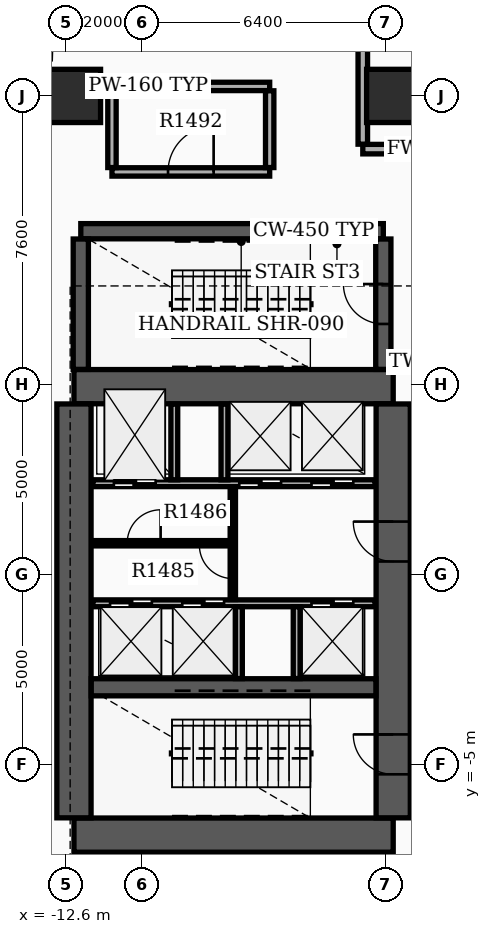
"""IFC4 building model, lengths in metres.
Left out: names, types, materials, properties, quantities, classifications, styles, units other than length and angle.
Written with IfcOpenShell. Run it as: python <this file> out.ifc"""

import sys

from ifc_helpers import new_model, si_unit, direction, frame, frame_2d, origin, origin_2d, place, context, subcontext, project, spatial, rectangle, extrude, element, fill, save


model = new_model("IFC4")
c1 = context("Model", 3, precision=1e-05, world=origin(), true_north=direction((0.0, 1.0)))
c2 = subcontext(c1, "Body", "Model", "MODEL_VIEW")
j1 = project(units=[si_unit("LENGTHUNIT", "METRE"), si_unit("PLANEANGLEUNIT", "RADIAN")], contexts=[c1])
p1 = place(None, origin())
s1 = spatial("IfcSite", under=j1, at=p1, CompositionType="ELEMENT")
p2 = place(p1, origin())
s2 = spatial("IfcBuilding", under=s1, at=p2, CompositionType="ELEMENT")
p3 = place(p2, frame((0.0, 0.0, 95.1)))
s3 = spatial("IfcBuildingStorey", under=s2, at=p3, CompositionType="ELEMENT", Elevation=95.1)
for number, where, z_axis, x_axis in (
    (1, (-12.4, -6.85, 0.0), (0.0, 0.0, 1.0), (1.0, 0.0, 0.0)),
    (2, (-12.4, 4.95, 0.0), (0.0, 0.0, 1.0), (1.0, 0.0, 0.0)),
):
    element("IfcWall", number, at=place(p3, frame(where, z_axis=z_axis, x_axis=x_axis)), inside=s3, PredefinedType="SHEAR", context=c2, shape_type="SweptSolid", body=[
        extrude(rectangle(XDim=8.4, YDim=0.9, at=frame_2d((4.2, 0.0))), origin(), (0.0, 0.0, 1.0), 4.85),
    ])
p4 = place(p3, frame((-12.4, -6.395, 0.0), z_axis=(0.0, 0.0, 1.0), x_axis=(0.0, 1.0, 0.0)))
e3 = element("IfcWall", 3, at=p4, inside=s3, PredefinedType="SHEAR", context=c2, shape_type="SweptSolid", body=[
    extrude(rectangle(XDim=10.89, YDim=0.9, at=frame_2d((5.445, 0.0))), origin(), (0.0, 0.0, 1.0), 4.85),
])
p5 = place(p3, frame((-4.0, -6.395, 0.0), z_axis=(0.0, 0.0, 1.0), x_axis=(0.0, 1.0, 0.0)))
e4 = element("IfcWall", 4, at=p5, inside=s3, PredefinedType="SHEAR", context=c2, shape_type="SweptSolid", body=[
    extrude(rectangle(XDim=10.89, YDim=0.9, at=frame_2d((5.445, 0.0))), origin(), (0.0, 0.0, 1.0), 4.85),
])
p6 = place(p5, frame((1.145, 0.0, 0.0)))
e5 = element("IfcOpeningElement", 5, at=p6, cuts=e4, PredefinedType="OPENING", context=c2, shape_type="SweptSolid", body=[
    extrude(rectangle(XDim=1.05, YDim=2.15, at=frame_2d((0.525, 1.075))), frame((0.0, 0.46, 0.0), z_axis=(0.0, -1.0, 0.0), x_axis=(1.0, 0.0, 0.0)), (0.0, 0.0, 1.0), 0.92),
])
p7 = place(p5, frame((6.745, 0.0, 0.0)))
e6 = element("IfcOpeningElement", 6, at=p7, cuts=e4, PredefinedType="OPENING", context=c2, shape_type="SweptSolid", body=[
    extrude(rectangle(XDim=1.05, YDim=2.15, at=frame_2d((0.525, 1.075))), frame((0.0, 0.46, 0.0), z_axis=(0.0, -1.0, 0.0), x_axis=(1.0, 0.0, 0.0)), (0.0, 0.0, 1.0), 0.92),
])
p8 = place(p3, frame((-11.945, -2.96, 0.0), z_axis=(0.0, 0.0, 1.0), x_axis=(1.0, 0.0, 0.0)))
e7 = element("IfcWall", 7, at=p8, inside=s3, PredefinedType="SHEAR", context=c2, shape_type="SweptSolid", body=[
    extrude(rectangle(XDim=7.49, YDim=0.45, at=frame_2d((3.745, 0.0))), origin(), (0.0, 0.0, 1.0), 4.85),
])
p9 = place(p3, frame((-12.22, 9.04, 0.0), z_axis=(0.0, 0.0, 1.0), x_axis=(1.0, 0.0, 0.0)))
e8 = element("IfcWall", 8, at=p9, inside=s3, PredefinedType="SHEAR", context=c2, shape_type="SweptSolid", body=[
    extrude(rectangle(XDim=7.96, YDim=0.4, at=frame_2d((3.98, 0.0))), origin(), (0.0, 0.0, 1.0), 4.85),
])
p10 = place(p3, frame((-12.22, 5.405, 0.0), z_axis=(0.0, 0.0, 1.0), x_axis=(0.0, 1.0, 0.0)))
e9 = element("IfcWall", 9, at=p10, inside=s3, PredefinedType="SHEAR", context=c2, shape_type="SweptSolid", body=[
    extrude(rectangle(XDim=3.43, YDim=0.4, at=frame_2d((1.715, 0.0))), origin(), (0.0, 0.0, 1.0), 4.85),
])
p11 = place(p3, frame((-4.26, 5.405, 0.0), z_axis=(0.0, 0.0, 1.0), x_axis=(0.0, 1.0, 0.0)))
e10 = element("IfcWall", 10, at=p11, inside=s3, PredefinedType="SHEAR", context=c2, shape_type="SweptSolid", body=[
    extrude(rectangle(XDim=3.43, YDim=0.4, at=frame_2d((1.715, 0.0))), origin(), (0.0, 0.0, 1.0), 4.85),
])
p12 = place(p11, frame((1.195, 0.0, 0.0)))
e11 = element("IfcOpeningElement", 11, at=p12, cuts=e10, PredefinedType="OPENING", context=c2, shape_type="SweptSolid", body=[
    extrude(rectangle(XDim=1.05, YDim=2.15, at=frame_2d((0.525, 1.075))), frame((0.0, 0.21, 0.0), z_axis=(0.0, -1.0, 0.0), x_axis=(1.0, 0.0, 0.0)), (0.0, 0.0, 1.0), 0.42),
])
for number, where, z_axis, x_axis in (
    (12, (-12.4, 12.6, 0.0), (0.0, 0.0, 1.0), (1.0, 0.0, 0.0)),
    (13, (-4.0, 12.6, 0.0), (0.0, 0.0, 1.0), (1.0, 0.0, 0.0)),
):
    element("IfcColumn", number, at=place(p3, frame(where, z_axis=z_axis, x_axis=x_axis)), inside=s3, PredefinedType="COLUMN", context=c2, shape_type="SweptSolid", body=[
        extrude(rectangle(XDim=1.4, YDim=1.4, at=origin_2d()), origin(), (0.0, 0.0, 1.0), 5.1),
    ])
p13 = place(p3, frame((-11.9, 2.41, 0.0), z_axis=(0.0, 0.0, 1.0), x_axis=(1.0, 0.0, 0.0)))
e14 = element("IfcWall", 14, at=p13, inside=s3, PredefinedType="SOLIDWALL", context=c2, shape_type="SweptSolid", body=[
    extrude(rectangle(XDim=7.42, YDim=0.18, at=frame_2d((3.71, 0.0))), origin(), (0.0, 0.0, 1.0), 3.92),
])
p14 = place(p13, frame((0.55, 0.0, 0.0)))
e15 = element("IfcOpeningElement", 15, at=p14, cuts=e14, PredefinedType="OPENING", context=c2, shape_type="SweptSolid", body=[
    extrude(rectangle(XDim=1.1, YDim=2.15, at=frame_2d((0.55, 1.075))), frame((0.0, 0.1, 0.0), z_axis=(0.0, -1.0, 0.0), x_axis=(1.0, 0.0, 0.0)), (0.0, 0.0, 1.0), 0.2),
])
p15 = place(p13, frame((3.85, 0.0, 0.0)))
e16 = element("IfcOpeningElement", 16, at=p15, cuts=e14, PredefinedType="OPENING", context=c2, shape_type="SweptSolid", body=[
    extrude(rectangle(XDim=1.1, YDim=2.15, at=frame_2d((0.55, 1.075))), frame((0.0, 0.1, 0.0), z_axis=(0.0, -1.0, 0.0), x_axis=(1.0, 0.0, 0.0)), (0.0, 0.0, 1.0), 0.2),
])
p16 = place(p13, frame((5.75, 0.0, 0.0)))
e17 = element("IfcOpeningElement", 17, at=p16, cuts=e14, PredefinedType="OPENING", context=c2, shape_type="SweptSolid", body=[
    extrude(rectangle(XDim=1.1, YDim=2.15, at=frame_2d((0.55, 1.075))), frame((0.0, 0.1, 0.0), z_axis=(0.0, -1.0, 0.0), x_axis=(1.0, 0.0, 0.0)), (0.0, 0.0, 1.0), 0.2),
])
p17 = place(p3, frame((-11.9, -0.75, 0.0), z_axis=(0.0, 0.0, 1.0), x_axis=(1.0, 0.0, 0.0)))
e18 = element("IfcWall", 18, at=p17, inside=s3, PredefinedType="SOLIDWALL", context=c2, shape_type="SweptSolid", body=[
    extrude(rectangle(XDim=7.42, YDim=0.18, at=frame_2d((3.71, 0.0))), origin(), (0.0, 0.0, 1.0), 3.92),
])
p18 = place(p17, frame((0.45, 0.0, 0.0)))
e19 = element("IfcOpeningElement", 19, at=p18, cuts=e18, PredefinedType="OPENING", context=c2, shape_type="SweptSolid", body=[
    extrude(rectangle(XDim=1.1, YDim=2.15, at=frame_2d((0.55, 1.075))), frame((0.0, 0.1, 0.0), z_axis=(0.0, -1.0, 0.0), x_axis=(1.0, 0.0, 0.0)), (0.0, 0.0, 1.0), 0.2),
])
p19 = place(p17, frame((2.35, 0.0, 0.0)))
e20 = element("IfcOpeningElement", 20, at=p19, cuts=e18, PredefinedType="OPENING", context=c2, shape_type="SweptSolid", body=[
    extrude(rectangle(XDim=1.1, YDim=2.15, at=frame_2d((0.55, 1.075))), frame((0.0, 0.1, 0.0), z_axis=(0.0, -1.0, 0.0), x_axis=(1.0, 0.0, 0.0)), (0.0, 0.0, 1.0), 0.2),
])
p20 = place(p17, frame((5.75, 0.0, 0.0)))
e21 = element("IfcOpeningElement", 21, at=p20, cuts=e18, PredefinedType="OPENING", context=c2, shape_type="SweptSolid", body=[
    extrude(rectangle(XDim=1.1, YDim=2.15, at=frame_2d((0.55, 1.075))), frame((0.0, 0.1, 0.0), z_axis=(0.0, -1.0, 0.0), x_axis=(1.0, 0.0, 0.0)), (0.0, 0.0, 1.0), 0.2),
])
for number, where, z_axis, x_axis in (
    (22, (-9.76, 2.5, 0.0), (0.0, 0.0, 1.0), (0.0, 1.0, 0.0)),
    (23, (-8.44, 2.5, 0.0), (0.0, 0.0, 1.0), (0.0, 1.0, 0.0)),
):
    element("IfcWall", number, at=place(p3, frame(where, z_axis=z_axis, x_axis=x_axis)), inside=s3, PredefinedType="SOLIDWALL", context=c2, shape_type="SweptSolid", body=[
        extrude(rectangle(XDim=1.99, YDim=0.18, at=frame_2d((0.995, 0.0))), origin(), (0.0, 0.0, 1.0), 3.92),
    ])
for number, where, z_axis, x_axis in (
    (24, (-8.06, -2.73, 0.0), (0.0, 0.0, 1.0), (0.0, 1.0, 0.0)),
    (25, (-6.54, -2.73, 0.0), (0.0, 0.0, 1.0), (0.0, 1.0, 0.0)),
):
    element("IfcWall", number, at=place(p3, frame(where, z_axis=z_axis, x_axis=x_axis)), inside=s3, PredefinedType="SOLIDWALL", context=c2, shape_type="SweptSolid", body=[
        extrude(rectangle(XDim=1.89, YDim=0.18, at=frame_2d((0.945, 0.0))), origin(), (0.0, 0.0, 1.0), 3.92),
    ])
p21 = place(p3, frame((-8.22, -0.65, 0.0), z_axis=(0.0, 0.0, 1.0), x_axis=(0.0, 1.0, 0.0)))
e26 = element("IfcWall", 26, at=p21, inside=s3, PredefinedType="SOLIDWALL", context=c2, shape_type="SweptSolid", body=[
    extrude(rectangle(XDim=2.96, YDim=0.14, at=frame_2d((1.48, 0.0))), origin(), (0.0, 0.0, 1.0), 3.92),
])
p22 = place(p21, frame((0.55, 0.0, 0.0)))
e27 = element("IfcOpeningElement", 27, at=p22, cuts=e26, PredefinedType="OPENING", context=c2, shape_type="SweptSolid", body=[
    extrude(rectangle(XDim=0.88, YDim=2.1, at=frame_2d((0.44, 1.05))), frame((0.0, 0.08, 0.0), z_axis=(0.0, -1.0, 0.0), x_axis=(1.0, 0.0, 0.0)), (0.0, 0.0, 1.0), 0.16),
])
p23 = place(p3, frame((-11.85, 0.83, 0.0), z_axis=(0.0, 0.0, 1.0), x_axis=(1.0, 0.0, 0.0)))
e28 = element("IfcWall", 28, at=p23, inside=s3, PredefinedType="PARTITIONING", context=c2, shape_type="SweptSolid", body=[
    extrude(rectangle(XDim=3.552, YDim=0.14, at=frame_2d((1.776, 0.0))), origin(), (0.0, 0.0, 1.0), 3.92),
])
p24 = place(p23, frame((0.85, 0.0, 0.0)))
e29 = element("IfcOpeningElement", 29, at=p24, cuts=e28, PredefinedType="OPENING", context=c2, shape_type="SweptSolid", body=[
    extrude(rectangle(XDim=0.88, YDim=2.1, at=frame_2d((0.44, 1.05))), frame((0.0, 0.08, 0.0), z_axis=(0.0, -1.0, 0.0), x_axis=(1.0, 0.0, 0.0)), (0.0, 0.0, 1.0), 0.16),
])
p25 = place(p3, frame((-4.8, 11.2, 0.0), z_axis=(0.0, 0.0, 1.0), x_axis=(1.0, 0.0, 0.0)))
e30 = element("IfcWall", 30, at=p25, inside=s3, PredefinedType="SOLIDWALL", context=c2, shape_type="SweptSolid", body=[
    extrude(rectangle(XDim=9.6, YDim=0.25, at=frame_2d((4.8, 0.0))), origin(), (0.0, 0.0, 1.0), 3.92),
])
p26 = place(p25, frame((4.2, 0.0, 0.0)))
e31 = element("IfcOpeningElement", 31, at=p26, cuts=e30, PredefinedType="OPENING", context=c2, shape_type="SweptSolid", body=[
    extrude(rectangle(XDim=1.2, YDim=2.15, at=frame_2d((0.6, 1.075))), frame((0.0, 0.135, 0.0), z_axis=(0.0, -1.0, 0.0), x_axis=(1.0, 0.0, 0.0)), (0.0, 0.0, 1.0), 0.27),
])
p27 = place(p3, frame((-4.8, 11.33, 0.0), z_axis=(0.0, 0.0, 1.0), x_axis=(0.0, 1.0, 0.0)))
e32 = element("IfcWall", 32, at=p27, inside=s3, PredefinedType="SOLIDWALL", context=c2, shape_type="SweptSolid", body=[
    extrude(rectangle(XDim=7.04, YDim=0.25, at=frame_2d((3.52, 0.0))), origin(), (0.0, 0.0, 1.0), 3.92),
])
p28 = place(p3, frame((-11.4, 10.6, 0.0), z_axis=(0.0, 0.0, 1.0), x_axis=(1.0, 0.0, 0.0)))
e33 = element("IfcWall", 33, at=p28, inside=s3, PredefinedType="PARTITIONING", context=c2, shape_type="SweptSolid", body=[
    extrude(rectangle(XDim=4.15, YDim=0.22, at=frame_2d((2.075, 0.0))), origin(), (0.0, 0.0, 1.0), 3.92),
])
p29 = place(p28, frame((1.475, 0.0, 0.0)))
e34 = element("IfcOpeningElement", 34, at=p29, cuts=e33, PredefinedType="OPENING", context=c2, shape_type="SweptSolid", body=[
    extrude(rectangle(XDim=1.2, YDim=2.15, at=frame_2d((0.6, 1.075))), frame((0.0, 0.12, 0.0), z_axis=(0.0, -1.0, 0.0), x_axis=(1.0, 0.0, 0.0)), (0.0, 0.0, 1.0), 0.24),
])
p30 = place(p3, frame((-11.4, 12.85, 0.0), z_axis=(0.0, 0.0, 1.0), x_axis=(1.0, 0.0, 0.0)))
e35 = element("IfcWall", 35, at=p30, inside=s3, PredefinedType="PARTITIONING", context=c2, shape_type="SweptSolid", body=[
    extrude(rectangle(XDim=4.15, YDim=0.22, at=frame_2d((2.075, 0.0))), origin(), (0.0, 0.0, 1.0), 3.92),
])
for number, where, z_axis, x_axis in (
    (36, (-11.4, 10.715, 0.0), (0.0, 0.0, 1.0), (0.0, 1.0, 0.0)),
    (37, (-7.25, 10.715, 0.0), (0.0, 0.0, 1.0), (0.0, 1.0, 0.0)),
):
    element("IfcWall", number, at=place(p3, frame(where, z_axis=z_axis, x_axis=x_axis)), inside=s3, PredefinedType="PARTITIONING", context=c2, shape_type="SweptSolid", body=[
        extrude(rectangle(XDim=2.02, YDim=0.22, at=frame_2d((1.01, 0.0))), origin(), (0.0, 0.0, 1.0), 3.92),
    ])
p31 = place(p6, origin())
e38 = element("IfcDoor", 38, at=p31, inside=s3, OperationType="SINGLE_SWING_RIGHT", PredefinedType="DOOR", context=c2, shape_type="SweptSolid", body=[
    extrude(rectangle(XDim=1.05, YDim=2.15, at=frame_2d((0.525, 1.075))), frame((0.0, 0.025, 0.0), z_axis=(0.0, -1.0, 0.0), x_axis=(1.0, 0.0, 0.0)), (0.0, 0.0, 1.0), 0.05),
])
fill(e5, e38)
p32 = place(p7, origin())
e39 = element("IfcDoor", 39, at=p32, inside=s3, OperationType="SINGLE_SWING_RIGHT", PredefinedType="DOOR", context=c2, shape_type="SweptSolid", body=[
    extrude(rectangle(XDim=1.05, YDim=2.15, at=frame_2d((0.525, 1.075))), frame((0.0, 0.025, 0.0), z_axis=(0.0, -1.0, 0.0), x_axis=(1.0, 0.0, 0.0)), (0.0, 0.0, 1.0), 0.05),
])
fill(e6, e39)
p33 = place(p12, origin())
e40 = element("IfcDoor", 40, at=p33, inside=s3, OperationType="SINGLE_SWING_RIGHT", PredefinedType="DOOR", context=c2, shape_type="SweptSolid", body=[
    extrude(rectangle(XDim=1.05, YDim=2.15, at=frame_2d((0.525, 1.075))), frame((0.0, 0.025, 0.0), z_axis=(0.0, -1.0, 0.0), x_axis=(1.0, 0.0, 0.0)), (0.0, 0.0, 1.0), 0.05),
])
fill(e11, e40)
p34 = place(p14, origin())
e41 = element("IfcDoor", 41, at=p34, inside=s3, OperationType="DOUBLE_DOOR_SLIDING", PredefinedType="DOOR", context=c2, shape_type="SweptSolid", body=[
    extrude(rectangle(XDim=1.1, YDim=2.15, at=frame_2d((0.55, 1.075))), frame((0.0, 0.025, 0.0), z_axis=(0.0, -1.0, 0.0), x_axis=(1.0, 0.0, 0.0)), (0.0, 0.0, 1.0), 0.05),
])
fill(e15, e41)
p35 = place(p15, origin())
e42 = element("IfcDoor", 42, at=p35, inside=s3, OperationType="DOUBLE_DOOR_SLIDING", PredefinedType="DOOR", context=c2, shape_type="SweptSolid", body=[
    extrude(rectangle(XDim=1.1, YDim=2.15, at=frame_2d((0.55, 1.075))), frame((0.0, 0.025, 0.0), z_axis=(0.0, -1.0, 0.0), x_axis=(1.0, 0.0, 0.0)), (0.0, 0.0, 1.0), 0.05),
])
fill(e16, e42)
p36 = place(p16, origin())
e43 = element("IfcDoor", 43, at=p36, inside=s3, OperationType="DOUBLE_DOOR_SLIDING", PredefinedType="DOOR", context=c2, shape_type="SweptSolid", body=[
    extrude(rectangle(XDim=1.1, YDim=2.15, at=frame_2d((0.55, 1.075))), frame((0.0, 0.025, 0.0), z_axis=(0.0, -1.0, 0.0), x_axis=(1.0, 0.0, 0.0)), (0.0, 0.0, 1.0), 0.05),
])
fill(e17, e43)
p37 = place(p18, origin())
e44 = element("IfcDoor", 44, at=p37, inside=s3, OperationType="DOUBLE_DOOR_SLIDING", PredefinedType="DOOR", context=c2, shape_type="SweptSolid", body=[
    extrude(rectangle(XDim=1.1, YDim=2.15, at=frame_2d((0.55, 1.075))), frame((0.0, 0.025, 0.0), z_axis=(0.0, -1.0, 0.0), x_axis=(1.0, 0.0, 0.0)), (0.0, 0.0, 1.0), 0.05),
])
fill(e19, e44)
p38 = place(p19, origin())
e45 = element("IfcDoor", 45, at=p38, inside=s3, OperationType="DOUBLE_DOOR_SLIDING", PredefinedType="DOOR", context=c2, shape_type="SweptSolid", body=[
    extrude(rectangle(XDim=1.1, YDim=2.15, at=frame_2d((0.55, 1.075))), frame((0.0, 0.025, 0.0), z_axis=(0.0, -1.0, 0.0), x_axis=(1.0, 0.0, 0.0)), (0.0, 0.0, 1.0), 0.05),
])
fill(e20, e45)
p39 = place(p20, origin())
e46 = element("IfcDoor", 46, at=p39, inside=s3, OperationType="DOUBLE_DOOR_SLIDING", PredefinedType="DOOR", context=c2, shape_type="SweptSolid", body=[
    extrude(rectangle(XDim=1.1, YDim=2.15, at=frame_2d((0.55, 1.075))), frame((0.0, 0.025, 0.0), z_axis=(0.0, -1.0, 0.0), x_axis=(1.0, 0.0, 0.0)), (0.0, 0.0, 1.0), 0.05),
])
fill(e21, e46)
p40 = place(p22, origin())
e47 = element("IfcDoor", 47, at=p40, inside=s3, OperationType="SINGLE_SWING_RIGHT", PredefinedType="DOOR", context=c2, shape_type="SweptSolid", body=[
    extrude(rectangle(XDim=0.88, YDim=2.1, at=frame_2d((0.44, 1.05))), frame((0.0, 0.025, 0.0), z_axis=(0.0, -1.0, 0.0), x_axis=(1.0, 0.0, 0.0)), (0.0, 0.0, 1.0), 0.05),
])
fill(e27, e47)
p41 = place(p24, origin())
e48 = element("IfcDoor", 48, at=p41, inside=s3, OperationType="SINGLE_SWING_RIGHT", PredefinedType="DOOR", context=c2, shape_type="SweptSolid", body=[
    extrude(rectangle(XDim=0.88, YDim=2.1, at=frame_2d((0.44, 1.05))), frame((0.0, 0.025, 0.0), z_axis=(0.0, -1.0, 0.0), x_axis=(1.0, 0.0, 0.0)), (0.0, 0.0, 1.0), 0.05),
])
fill(e29, e48)
p42 = place(p29, origin())
e49 = element("IfcDoor", 49, at=p42, inside=s3, OperationType="SINGLE_SWING_RIGHT", PredefinedType="DOOR", context=c2, shape_type="SweptSolid", body=[
    extrude(rectangle(XDim=1.2, YDim=2.15, at=frame_2d((0.6, 1.075))), frame((0.0, 0.025, 0.0), z_axis=(0.0, -1.0, 0.0), x_axis=(1.0, 0.0, 0.0)), (0.0, 0.0, 1.0), 0.05),
])
fill(e34, e49)
save(model, sys.argv[1])
